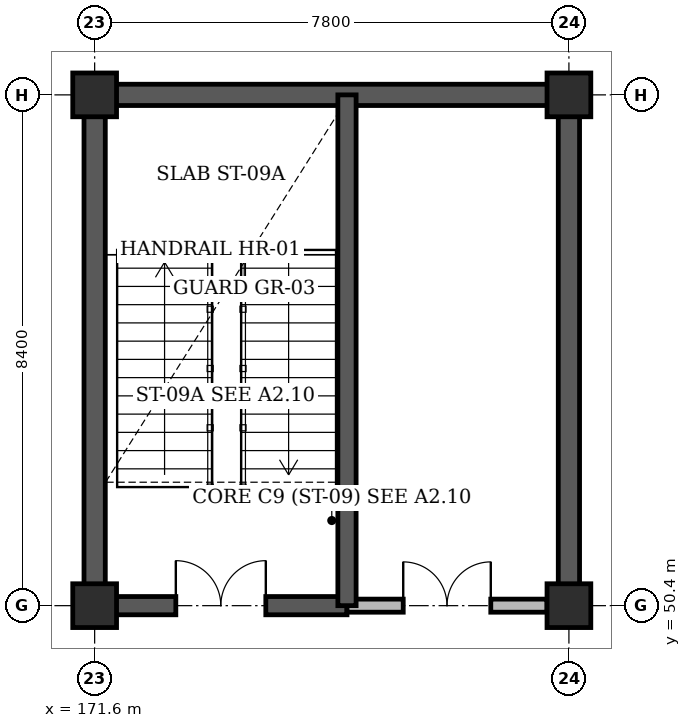
"""IFC4 building model, lengths in metres.
Left out: names, types, materials, properties, quantities, classifications, styles, units other than length and angle.
Written with IfcOpenShell. Run it as: python <this file> out.ifc"""

import sys

from ifc_helpers import new_model, si_unit, direction, frame, frame_2d, origin, origin_2d, place, context, subcontext, project, spatial, rectangle, extrude, element, fill, save


model = new_model("IFC4")
c1 = context("Model", 3, precision=1e-05, world=origin(), true_north=direction((0.0, 1.0)))
c2 = subcontext(c1, "Body", "Model", "MODEL_VIEW")
j1 = project(units=[si_unit("LENGTHUNIT", "METRE"), si_unit("PLANEANGLEUNIT", "RADIAN")], contexts=[c1])
p1 = place(None, origin())
s1 = spatial("IfcSite", under=j1, at=p1, CompositionType="ELEMENT")
p2 = place(p1, origin())
s2 = spatial("IfcBuilding", under=s1, at=p2, CompositionType="ELEMENT")
p3 = place(p2, origin())
s3 = spatial("IfcBuildingStorey", under=s2, at=p3, CompositionType="ELEMENT", Elevation=0.0)
p4 = place(p3, frame((171.425, 58.8, 0.0), z_axis=(0.0, 0.0, 1.0), x_axis=(1.0, 0.0, 0.0)))
e1 = element("IfcWall", 1, at=p4, inside=s3, PredefinedType="SHEAR", context=c2, shape_type="SweptSolid", body=[
    extrude(rectangle(XDim=8.15, YDim=0.35, at=frame_2d((4.075, 0.0))), origin(), (0.0, 0.0, 1.0), 4.48),
])
for number, where, z_axis, x_axis in (
    (2, (171.6, 50.4, 0.0), (0.0, 0.0, 1.0), (0.0, 1.0, 0.0)),
    (3, (179.4, 50.4, 0.0), (0.0, 0.0, 1.0), (0.0, 1.0, 0.0)),
):
    element("IfcWall", number, at=place(p3, frame(where, z_axis=z_axis, x_axis=x_axis)), inside=s3, PredefinedType="SHEAR", context=c2, shape_type="SweptSolid", body=[
        extrude(rectangle(XDim=8.4, YDim=0.35, at=frame_2d((4.2, 0.0))), origin(), (0.0, 0.0, 1.0), 4.48),
    ])
for number, where, z_axis, x_axis in (
    (4, (171.6, 50.4, 0.0), (0.0, 0.0, 1.0), (1.0, 0.0, 0.0)),
    (5, (171.6, 58.8, 0.0), (0.0, 0.0, 1.0), (1.0, 0.0, 0.0)),
    (6, (179.4, 50.4, 0.0), (0.0, 0.0, 1.0), (1.0, 0.0, 0.0)),
    (7, (179.4, 58.8, 0.0), (0.0, 0.0, 1.0), (1.0, 0.0, 0.0)),
):
    element("IfcColumn", number, at=place(p3, frame(where, z_axis=z_axis, x_axis=x_axis)), inside=s3, PredefinedType="COLUMN", context=c2, shape_type="SweptSolid", body=[
        extrude(rectangle(XDim=0.72, YDim=0.72, at=origin_2d()), origin(), (0.0, 0.0, 1.0), 4.8),
    ])
p5 = place(p3, frame((171.6, 50.4, 0.0), z_axis=(0.0, 0.0, 1.0), x_axis=(1.0, 0.0, 0.0)))
e8 = element("IfcWall", 8, at=p5, inside=s3, PredefinedType="SHEAR", context=c2, shape_type="SweptSolid", body=[
    extrude(rectangle(XDim=4.15, YDim=0.3, at=frame_2d((2.075, 0.0))), origin(), (0.0, 0.0, 1.0), 4.8),
])
p6 = place(p5, frame((1.335, 0.0, 0.0)))
e9 = element("IfcOpeningElement", 9, at=p6, cuts=e8, PredefinedType="OPENING", context=c2, shape_type="SweptSolid", body=[
    extrude(rectangle(XDim=1.48, YDim=2.2, at=frame_2d((0.74, 1.1))), frame((0.0, 0.16, 0.0), z_axis=(0.0, -1.0, 0.0), x_axis=(1.0, 0.0, 0.0)), (0.0, 0.0, 1.0), 0.32),
])
p7 = place(p3, frame((175.75, 50.4, 0.0), z_axis=(0.0, 0.0, 1.0), x_axis=(1.0, 0.0, 0.0)))
e10 = element("IfcWall", 10, at=p7, inside=s3, PredefinedType="STANDARD", context=c2, shape_type="SweptSolid", body=[
    extrude(rectangle(XDim=3.29, YDim=0.215, at=frame_2d((1.645, 0.0))), origin(), (0.0, 0.0, 1.0), 3.63),
])
p8 = place(p7, frame((0.925, 0.0, 0.0)))
e11 = element("IfcOpeningElement", 11, at=p8, cuts=e10, PredefinedType="OPENING", context=c2, shape_type="SweptSolid", body=[
    extrude(rectangle(XDim=1.44, YDim=2.2, at=frame_2d((0.72, 1.1))), frame((0.0, 0.118, 0.0), z_axis=(0.0, -1.0, 0.0), x_axis=(1.0, 0.0, 0.0)), (0.0, 0.0, 1.0), 0.235),
])
p9 = place(p3, frame((175.75, 50.4, 0.0), z_axis=(0.0, 0.0, 1.0), x_axis=(0.0, 1.0, 0.0)))
e12 = element("IfcWall", 12, at=p9, inside=s3, PredefinedType="SHEAR", context=c2, shape_type="SweptSolid", body=[
    extrude(rectangle(XDim=8.4, YDim=0.3, at=frame_2d((4.2, 0.0))), origin(), (0.0, 0.0, 1.0), 4.8),
])
p10 = place(p6, origin())
e13 = element("IfcDoor", 13, at=p10, inside=s3, OperationType="DOUBLE_DOOR_SINGLE_SWING", PredefinedType="DOOR", context=c2, shape_type="SweptSolid", body=[
    extrude(rectangle(XDim=1.48, YDim=2.2, at=frame_2d((0.74, 1.1))), frame((0.0, 0.025, 0.0), z_axis=(0.0, -1.0, 0.0), x_axis=(1.0, 0.0, 0.0)), (0.0, 0.0, 1.0), 0.05),
])
fill(e9, e13)
p11 = place(p8, origin())
e14 = element("IfcDoor", 14, at=p11, inside=s3, OperationType="DOUBLE_DOOR_SINGLE_SWING", PredefinedType="DOOR", context=c2, shape_type="SweptSolid", body=[
    extrude(rectangle(XDim=1.44, YDim=2.2, at=frame_2d((0.72, 1.1))), frame((0.0, 0.025, 0.0), z_axis=(0.0, -1.0, 0.0), x_axis=(1.0, 0.0, 0.0)), (0.0, 0.0, 1.0), 0.05),
])
fill(e11, e14)
save(model, sys.argv[1])
